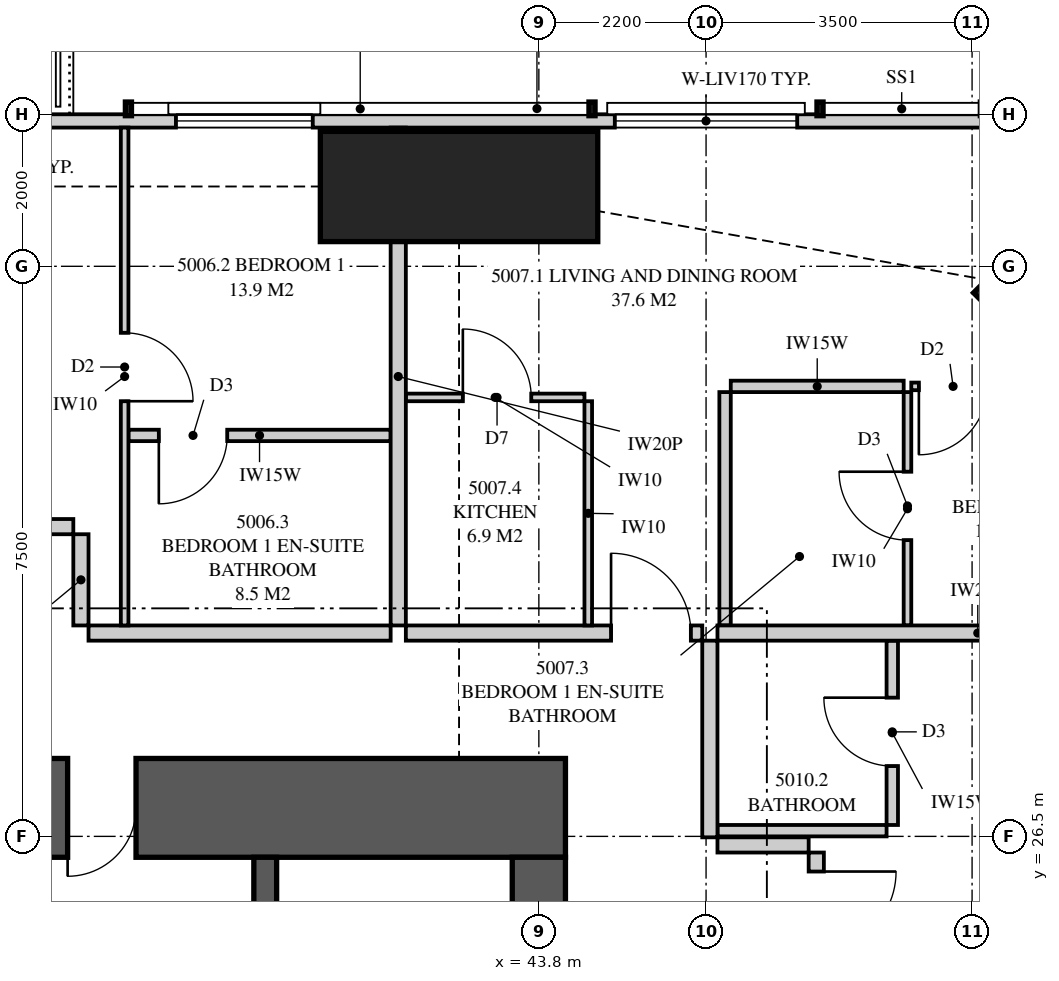
"""IFC4 building model, lengths in metres.
Left out: names, types, materials, properties, quantities, classifications, styles, units other than length and angle.
Written with IfcOpenShell. Run it as: python <this file> out.ifc"""

import sys

from ifc_helpers import new_model, si_unit, direction, frame, frame_2d, origin, origin_2d, place, context, subcontext, project, spatial, polyline, rectangle, outline, extrude, element, fill, save


model = new_model("IFC4")
c1 = context("Model", 3, precision=1e-05, world=origin(), true_north=direction((0.0, 1.0)))
c2 = subcontext(c1, "Body", "Model", "MODEL_VIEW")
j1 = project(units=[si_unit("LENGTHUNIT", "METRE"), si_unit("PLANEANGLEUNIT", "RADIAN")], contexts=[c1])
p1 = place(None, origin())
s1 = spatial("IfcSite", under=j1, at=p1, CompositionType="ELEMENT")
p2 = place(p1, origin())
s2 = spatial("IfcBuilding", under=s1, at=p2, CompositionType="ELEMENT")
p3 = place(p2, frame((0.0, 0.0, 184.5)))
s3 = spatial("IfcBuildingStorey", under=s2, at=p3, CompositionType="ELEMENT", Elevation=184.5)
p4 = place(p3, frame((50.652, 33.652, 0.0), z_axis=(0.0, 0.0, 1.0), x_axis=(0.707106781187, 0.707106781187, 0.0)))
e1 = element("IfcColumn", 1, at=p4, inside=s3, PredefinedType="COLUMN", context=c2, shape_type="SweptSolid", body=[
    extrude(rectangle(XDim=1.6, YDim=1.6, at=origin_2d()), origin(), (0.0, 0.0, 1.0), 3.35),
])
p5 = place(p3, frame((42.75, 35.05, 0.0), z_axis=(0.0, 0.0, 1.0), x_axis=(0.0, 1.0, 0.0)))
e2 = element("IfcColumn", 2, at=p5, inside=s3, PredefinedType="COLUMN", context=c2, shape_type="SweptSolid", body=[
    extrude(rectangle(XDim=1.45, YDim=3.65, at=origin_2d()), origin(), (0.0, 0.0, 1.0), 3.35),
])
p6 = place(p3, frame((44.15, 26.875, 0.0), z_axis=(0.0, 0.0, 1.0), x_axis=(-1.0, 0.0, 0.0)))
e3 = element("IfcWall", 3, at=p6, inside=s3, PredefinedType="SHEAR", context=c2, shape_type="SweptSolid", body=[
    extrude(rectangle(XDim=8.25, YDim=1.3, at=frame_2d((4.125, 0.0))), origin(), (0.0, 0.0, 1.0), 3.35),
])
p7 = place(p6, frame((5.65, 0.0, 0.0)))
e4 = element("IfcOpeningElement", 4, at=p7, cuts=e3, PredefinedType="OPENING", context=c2, shape_type="SweptSolid", body=[
    extrude(rectangle(XDim=0.9, YDim=2.1, at=frame_2d((0.45, 1.05))), frame((0.0, 0.66, 0.0), z_axis=(0.0, -1.0, 0.0), x_axis=(1.0, 0.0, 0.0)), (0.0, 0.0, 1.0), 1.32),
])
p8 = place(p3, frame((43.8, 19.3, 0.0), z_axis=(0.0, 0.0, 1.0), x_axis=(0.0, 1.0, 0.0)))
e5 = element("IfcWall", 5, at=p8, inside=s3, PredefinedType="SHEAR", context=c2, shape_type="SweptSolid", body=[
    extrude(rectangle(XDim=6.925, YDim=0.7, at=frame_2d((3.462, 0.0))), origin(), (0.0, 0.0, 1.0), 3.35),
])
p9 = place(p3, frame((40.2, 18.5, 0.0), z_axis=(0.0, 0.0, 1.0), x_axis=(0.0, 1.0, 0.0)))
e6 = element("IfcWall", 6, at=p9, inside=s3, PredefinedType="SHEAR", context=c2, shape_type="SweptSolid", body=[
    extrude(rectangle(XDim=7.725, YDim=0.3, at=frame_2d((3.863, 0.0))), origin(), (0.0, 0.0, 1.0), 3.35),
])
p10 = place(p3, frame((49.949, 35.913, 0.0), z_axis=(0.0, 0.0, 1.0), x_axis=(-1.0, 0.0, 0.0)))
e7 = element("IfcWall", 7, at=p10, inside=s3, PredefinedType="SOLIDWALL", context=c2, shape_type="SweptSolid", body=[
    extrude(outline(polyline([(0.0, 0.0), (34.897, 0.0), (34.897, 3.11), (27.91, 3.11), (27.91, 2.15), (27.836, 2.15), (27.836, 3.11), (27.699, 3.11), (27.699, 2.15), (7.199, 2.15), (7.199, 3.11), (7.062, 3.11), (7.062, 2.15), (6.987, 2.15), (6.987, 3.11), (0.0, 3.11), (0.0, 0.0)])), frame((0.0, 0.087, 0.0), z_axis=(0.0, -1.0, 0.0), x_axis=(1.0, 0.0, 0.0)), (0.0, 0.0, 1.0), 0.175),
])
p11 = place(p10, frame((2.75, 0.0, 0.4)))
e8 = element("IfcOpeningElement", 8, at=p11, cuts=e7, PredefinedType="OPENING", context=c2, shape_type="SweptSolid", body=[
    extrude(rectangle(XDim=2.4, YDim=1.7, at=frame_2d((1.2, 0.85))), frame((0.0, 0.097, 0.0), z_axis=(0.0, -1.0, 0.0), x_axis=(1.0, 0.0, 0.0)), (0.0, 0.0, 1.0), 0.195),
])
p12 = place(p10, frame((9.124, 0.0, 0.4)))
e9 = element("IfcOpeningElement", 9, at=p12, cuts=e7, PredefinedType="OPENING", context=c2, shape_type="SweptSolid", body=[
    extrude(rectangle(XDim=1.8, YDim=1.7, at=frame_2d((0.9, 0.85))), frame((0.0, 0.097, 0.0), z_axis=(0.0, -1.0, 0.0), x_axis=(1.0, 0.0, 0.0)), (0.0, 0.0, 1.0), 0.195),
])
p13 = place(p10, frame((13.174, 0.0, 0.0)))
e10 = element("IfcOpeningElement", 10, at=p13, cuts=e7, PredefinedType="OPENING", context=c2, shape_type="SweptSolid", body=[
    extrude(rectangle(XDim=1.8, YDim=2.1, at=frame_2d((0.9, 1.05))), frame((0.0, 0.097, 0.0), z_axis=(0.0, -1.0, 0.0), x_axis=(1.0, 0.0, 0.0)), (0.0, 0.0, 1.0), 0.195),
])
p14 = place(p10, frame((19.849, 0.0, 0.4)))
e11 = element("IfcOpeningElement", 11, at=p14, cuts=e7, PredefinedType="OPENING", context=c2, shape_type="SweptSolid", body=[
    extrude(rectangle(XDim=1.8, YDim=1.7, at=frame_2d((0.9, 0.85))), frame((0.0, 0.097, 0.0), z_axis=(0.0, -1.0, 0.0), x_axis=(1.0, 0.0, 0.0)), (0.0, 0.0, 1.0), 0.195),
])
p15 = place(p10, frame((23.304, 0.0, 0.4)))
e12 = element("IfcOpeningElement", 12, at=p15, cuts=e7, PredefinedType="OPENING", context=c2, shape_type="SweptSolid", body=[
    extrude(rectangle(XDim=2.4, YDim=1.7, at=frame_2d((1.2, 0.85))), frame((0.0, 0.097, 0.0), z_axis=(0.0, -1.0, 0.0), x_axis=(1.0, 0.0, 0.0)), (0.0, 0.0, 1.0), 0.195),
])
p16 = place(p10, frame((30.249, 0.0, 0.4)))
e13 = element("IfcOpeningElement", 13, at=p16, cuts=e7, PredefinedType="OPENING", context=c2, shape_type="SweptSolid", body=[
    extrude(rectangle(XDim=1.8, YDim=1.7, at=frame_2d((0.9, 0.85))), frame((0.0, 0.097, 0.0), z_axis=(0.0, -1.0, 0.0), x_axis=(1.0, 0.0, 0.0)), (0.0, 0.0, 1.0), 0.195),
])
p17 = place(p3, frame((41.95, 35.825, 0.0), z_axis=(0.0, 0.0, 1.0), x_axis=(0.0, -1.0, 0.0)))
e14 = element("IfcWall", 14, at=p17, inside=s3, PredefinedType="PARTITIONING", context=c2, shape_type="SweptSolid", body=[
    extrude(outline(polyline([(0.529, 2.15), (0.0, 2.15), (0.0, 0.0), (0.529, 0.0), (0.529, 0.746), (1.021, 0.746), (1.021, 0.0), (6.55, 0.0), (6.55, 3.11), (1.685, 3.11), (1.685, 2.15), (1.021, 2.15), (1.021, 1.404), (0.529, 1.404), (0.529, 2.15)])), frame((0.0, 0.1, 0.0), z_axis=(0.0, -1.0, 0.0), x_axis=(1.0, 0.0, 0.0)), (0.0, 0.0, 1.0), 0.2),
])
p18 = place(p3, frame((38.35, 35.825, 0.0), z_axis=(0.0, 0.0, 1.0), x_axis=(0.0, -1.0, 0.0)))
e15 = element("IfcWall", 15, at=p18, inside=s3, PredefinedType="PARTITIONING", context=c2, shape_type="SweptSolid", body=[
    extrude(outline(polyline([(0.0, 0.0), (6.55, 0.0), (6.55, 3.11), (1.635, 3.11), (1.635, 2.15), (0.0, 2.15), (0.0, 3.11), (0.0, 0.0)])), frame((0.0, 0.05, 0.0), z_axis=(0.0, -1.0, 0.0), x_axis=(1.0, 0.0, 0.0)), (0.0, 0.0, 1.0), 0.1),
])
p19 = place(p18, frame((2.7, 0.0, 0.0)))
e16 = element("IfcOpeningElement", 16, at=p19, cuts=e15, PredefinedType="OPENING", context=c2, shape_type="SweptSolid", body=[
    extrude(rectangle(XDim=0.9, YDim=2.1, at=frame_2d((0.45, 1.05))), frame((0.0, 0.06, 0.0), z_axis=(0.0, -1.0, 0.0), x_axis=(1.0, 0.0, 0.0)), (0.0, 0.0, 1.0), 0.12),
])
p20 = place(p3, frame((38.4, 31.775, 0.0), z_axis=(0.0, 0.0, 1.0), x_axis=(1.0, 0.0, 0.0)))
e17 = element("IfcWall", 17, at=p20, inside=s3, PredefinedType="PLUMBINGWALL", context=c2, shape_type="SweptSolid", body=[
    extrude(rectangle(XDim=3.45, YDim=0.15, at=frame_2d((1.725, 0.0))), origin(), (0.0, 0.0, 1.0), 3.11),
])
p21 = place(p20, frame((0.4, 0.0, 0.0)))
e18 = element("IfcOpeningElement", 18, at=p21, cuts=e17, PredefinedType="OPENING", context=c2, shape_type="SweptSolid", body=[
    extrude(rectangle(XDim=0.9, YDim=2.1, at=frame_2d((0.45, 1.05))), frame((0.0, 0.085, 0.0), z_axis=(0.0, -1.0, 0.0), x_axis=(1.0, 0.0, 0.0)), (0.0, 0.0, 1.0), 0.17),
])
p22 = place(p3, frame((42.05, 29.175, 0.0), z_axis=(0.0, 0.0, 1.0), x_axis=(1.0, 0.0, 0.0)))
e19 = element("IfcWall", 19, at=p22, inside=s3, PredefinedType="PARTITIONING", context=c2, shape_type="SweptSolid", body=[
    extrude(outline(polyline([(0.0, 0.0), (3.9, 0.0), (3.9, 3.11), (1.037, 3.11), (1.037, 2.541), (0.363, 2.541), (0.363, 3.11), (0.0, 3.11), (0.0, 0.0)])), frame((0.0, 0.1, 0.0), z_axis=(0.0, -1.0, 0.0), x_axis=(1.0, 0.0, 0.0)), (0.0, 0.0, 1.0), 0.2),
])
p23 = place(p22, frame((2.7, 0.0, 0.0)))
e20 = element("IfcOpeningElement", 20, at=p23, cuts=e19, PredefinedType="OPENING", context=c2, shape_type="SweptSolid", body=[
    extrude(rectangle(XDim=1.05, YDim=2.2, at=frame_2d((0.525, 1.1))), frame((0.0, 0.11, 0.0), z_axis=(0.0, -1.0, 0.0), x_axis=(1.0, 0.0, 0.0)), (0.0, 0.0, 1.0), 0.22),
])
p24 = place(p3, frame((48.65, 32.345, 0.0), z_axis=(0.0, 0.0, 1.0), x_axis=(0.0, -1.0, 0.0)))
e21 = element("IfcWall", 21, at=p24, inside=s3, PredefinedType="PARTITIONING", context=c2, shape_type="SweptSolid", body=[
    extrude(rectangle(XDim=3.07, YDim=0.1, at=frame_2d((1.535, 0.0))), origin(), (0.0, 0.0, 1.0), 3.11),
])
p25 = place(p24, frame((1.048, 0.0, 0.0)))
e22 = element("IfcOpeningElement", 22, at=p25, cuts=e21, PredefinedType="OPENING", context=c2, shape_type="SweptSolid", body=[
    extrude(rectangle(XDim=0.9, YDim=2.1, at=frame_2d((0.45, 1.05))), frame((0.0, 0.06, 0.0), z_axis=(0.0, -1.0, 0.0), x_axis=(1.0, 0.0, 0.0)), (0.0, 0.0, 1.0), 0.12),
])
p26 = place(p3, frame((48.7, 32.42, 0.0), z_axis=(0.0, 0.0, 1.0), x_axis=(1.0, 0.0, 0.0)))
e23 = element("IfcWall", 23, at=p26, inside=s3, PredefinedType="PARTITIONING", context=c2, shape_type="SweptSolid", body=[
    extrude(outline(polyline([(0.0, 0.0), (4.3, 0.0), (4.3, 3.11), (3.022, 3.11), (3.022, 2.15), (1.279, 2.15), (1.279, 3.11), (0.0, 3.11), (0.0, 0.0)])), frame((0.0, 0.05, 0.0), z_axis=(0.0, -1.0, 0.0), x_axis=(1.0, 0.0, 0.0)), (0.0, 0.0, 1.0), 0.1),
])
p27 = place(p26, frame((0.1, 0.0, 0.0)))
e24 = element("IfcOpeningElement", 24, at=p27, cuts=e23, PredefinedType="OPENING", context=c2, shape_type="SweptSolid", body=[
    extrude(rectangle(XDim=0.9, YDim=2.1, at=frame_2d((0.45, 1.05))), frame((0.0, 0.06, 0.0), z_axis=(0.0, -1.0, 0.0), x_axis=(1.0, 0.0, 0.0)), (0.0, 0.0, 1.0), 0.12),
])
p28 = place(p3, frame((46.325, 32.42, 0.0), z_axis=(0.0, 0.0, 1.0), x_axis=(1.0, 0.0, 0.0)))
e25 = element("IfcWall", 25, at=p28, inside=s3, PredefinedType="PLUMBINGWALL", context=c2, shape_type="SweptSolid", body=[
    extrude(rectangle(XDim=2.275, YDim=0.15, at=frame_2d((1.138, 0.0))), origin(), (0.0, 0.0, 1.0), 3.11),
])
p29 = place(p3, frame((46.25, 32.345, 0.0), z_axis=(0.0, 0.0, 1.0), x_axis=(0.0, -1.0, 0.0)))
e26 = element("IfcWall", 26, at=p29, inside=s3, PredefinedType="PLUMBINGWALL", context=c2, shape_type="SweptSolid", body=[
    extrude(rectangle(XDim=3.07, YDim=0.15, at=frame_2d((1.535, 0.0))), origin(), (0.0, 0.0, 1.0), 3.11),
])
p30 = place(p3, frame((42.05, 32.275, 0.0), z_axis=(0.0, 0.0, 1.0), x_axis=(1.0, 0.0, 0.0)))
e27 = element("IfcWall", 27, at=p30, inside=s3, PredefinedType="PARTITIONING", context=c2, shape_type="SweptSolid", body=[
    extrude(outline(polyline([(0.0, 0.0), (2.35, 0.0), (2.35, 3.11), (0.987, 3.11), (0.987, 2.541), (0.413, 2.541), (0.413, 3.11), (0.0, 3.11), (0.0, 0.0)])), frame((0.0, 0.05, 0.0), z_axis=(0.0, -1.0, 0.0), x_axis=(1.0, 0.0, 0.0)), (0.0, 0.0, 1.0), 0.1),
])
p31 = place(p30, frame((0.75, 0.0, 0.0)))
e28 = element("IfcOpeningElement", 28, at=p31, cuts=e27, PredefinedType="OPENING", context=c2, shape_type="SweptSolid", body=[
    extrude(rectangle(XDim=0.9, YDim=2.1, at=frame_2d((0.45, 1.05))), frame((0.0, 0.06, 0.0), z_axis=(0.0, -1.0, 0.0), x_axis=(1.0, 0.0, 0.0)), (0.0, 0.0, 1.0), 0.12),
])
p32 = place(p3, frame((44.45, 32.225, 0.0), z_axis=(0.0, 0.0, 1.0), x_axis=(0.0, -1.0, 0.0)))
e29 = element("IfcWall", 29, at=p32, inside=s3, PredefinedType="PARTITIONING", context=c2, shape_type="SweptSolid", body=[
    extrude(rectangle(XDim=2.95, YDim=0.1, at=frame_2d((1.475, 0.0))), origin(), (0.0, 0.0, 1.0), 3.11),
])
p33 = place(p3, frame((46.15, 29.175, 0.0), z_axis=(0.0, 0.0, 1.0), x_axis=(1.0, 0.0, 0.0)))
e30 = element("IfcWall", 30, at=p33, inside=s3, PredefinedType="PARTITIONING", context=c2, shape_type="SweptSolid", body=[
    extrude(outline(polyline([(0.0, 0.0), (6.85, 0.0), (6.85, 3.11), (6.147, 3.11), (6.147, 2.15), (4.303, 2.15), (4.303, 3.11), (0.0, 3.11), (0.0, 0.0)])), frame((0.0, 0.1, 0.0), z_axis=(0.0, -1.0, 0.0), x_axis=(1.0, 0.0, 0.0)), (0.0, 0.0, 1.0), 0.2),
])
p34 = place(p3, frame((48.45, 26.65, 0.0), z_axis=(0.0, 0.0, 1.0), x_axis=(0.0, 1.0, 0.0)))
e31 = element("IfcWall", 31, at=p34, inside=s3, PredefinedType="PLUMBINGWALL", context=c2, shape_type="SweptSolid", body=[
    extrude(rectangle(XDim=2.425, YDim=0.15, at=frame_2d((1.212, 0.0))), origin(), (0.0, 0.0, 1.0), 3.11),
])
p35 = place(p34, frame((0.775, 0.0, 0.0)))
e32 = element("IfcOpeningElement", 32, at=p35, cuts=e31, PredefinedType="OPENING", context=c2, shape_type="SweptSolid", body=[
    extrude(rectangle(XDim=0.9, YDim=2.1, at=frame_2d((0.45, 1.05))), frame((0.0, 0.085, 0.0), z_axis=(0.0, -1.0, 0.0), x_axis=(1.0, 0.0, 0.0)), (0.0, 0.0, 1.0), 0.17),
])
p36 = place(p3, frame((48.375, 26.575, 0.0), z_axis=(0.0, 0.0, 1.0), x_axis=(-1.0, 0.0, 0.0)))
e33 = element("IfcWall", 33, at=p36, inside=s3, PredefinedType="PLUMBINGWALL", context=c2, shape_type="SweptSolid", body=[
    extrude(rectangle(XDim=2.225, YDim=0.15, at=frame_2d((1.113, 0.0))), origin(), (0.0, 0.0, 1.0), 3.11),
])
p37 = place(p3, frame((37.875, 29.175, 0.0), z_axis=(0.0, 0.0, 1.0), x_axis=(1.0, 0.0, 0.0)))
e34 = element("IfcWall", 34, at=p37, inside=s3, PredefinedType="PARTITIONING", context=c2, shape_type="SweptSolid", body=[
    extrude(rectangle(XDim=3.975, YDim=0.2, at=frame_2d((1.988, 0.0))), origin(), (0.0, 0.0, 1.0), 3.11),
])
p38 = place(p3, frame((35.275, 30.575, 0.0), z_axis=(0.0, 0.0, 1.0), x_axis=(1.0, 0.0, 0.0)))
e35 = element("IfcWall", 35, at=p38, inside=s3, PredefinedType="PARTITIONING", context=c2, shape_type="SweptSolid", body=[
    extrude(rectangle(XDim=2.4, YDim=0.2, at=frame_2d((1.2, 0.0))), origin(), (0.0, 0.0, 1.0), 3.11),
])
p39 = place(p38, frame((0.7, 0.0, 0.0)))
e36 = element("IfcOpeningElement", 36, at=p39, cuts=e35, PredefinedType="OPENING", context=c2, shape_type="SweptSolid", body=[
    extrude(rectangle(XDim=1.05, YDim=2.2, at=frame_2d((0.525, 1.1))), frame((0.0, 0.11, 0.0), z_axis=(0.0, -1.0, 0.0), x_axis=(1.0, 0.0, 0.0)), (0.0, 0.0, 1.0), 0.22),
])
p40 = place(p3, frame((37.775, 29.275, 0.0), z_axis=(0.0, 0.0, 1.0), x_axis=(0.0, 1.0, 0.0)))
e37 = element("IfcWall", 37, at=p40, inside=s3, PredefinedType="PARTITIONING", context=c2, shape_type="SweptSolid", body=[
    extrude(rectangle(XDim=1.2, YDim=0.2, at=frame_2d((0.6, 0.0))), origin(), (0.0, 0.0, 1.0), 3.11),
])
p41 = place(p3, frame((46.05, 26.488, 0.0), z_axis=(0.0, 0.0, 1.0), x_axis=(0.0, 1.0, 0.0)))
e38 = element("IfcWall", 38, at=p41, inside=s3, PredefinedType="PARTITIONING", context=c2, shape_type="SweptSolid", body=[
    extrude(rectangle(XDim=2.587, YDim=0.2, at=frame_2d((1.294, 0.0))), origin(), (0.0, 0.0, 1.0), 3.11),
])
p42 = place(p3, frame((47.45, 23.887, 0.0), z_axis=(0.0, 0.0, 1.0), x_axis=(0.0, 1.0, 0.0)))
e39 = element("IfcWall", 39, at=p42, inside=s3, PredefinedType="PARTITIONING", context=c2, shape_type="SweptSolid", body=[
    extrude(outline(polyline([(0.0, 0.0), (2.4, 0.0), (2.4, 3.11), (1.45, 3.11), (1.45, 2.541), (0.775, 2.541), (0.775, 3.11), (0.0, 3.11), (0.0, 0.0)])), frame((0.0, 0.1, 0.0), z_axis=(0.0, -1.0, 0.0), x_axis=(1.0, 0.0, 0.0)), (0.0, 0.0, 1.0), 0.2),
])
p43 = place(p42, frame((1.1, 0.0, 0.0)))
e40 = element("IfcOpeningElement", 40, at=p43, cuts=e39, PredefinedType="OPENING", context=c2, shape_type="SweptSolid", body=[
    extrude(rectangle(XDim=1.05, YDim=2.2, at=frame_2d((0.525, 1.1))), frame((0.0, 0.11, 0.0), z_axis=(0.0, -1.0, 0.0), x_axis=(1.0, 0.0, 0.0)), (0.0, 0.0, 1.0), 0.22),
])
p44 = place(p3, frame((46.15, 26.387, 0.0), z_axis=(0.0, 0.0, 1.0), x_axis=(1.0, 0.0, 0.0)))
e41 = element("IfcWall", 41, at=p44, inside=s3, PredefinedType="PARTITIONING", context=c2, shape_type="SweptSolid", body=[
    extrude(rectangle(XDim=1.2, YDim=0.2, at=frame_2d((0.6, 0.0))), origin(), (0.0, 0.0, 1.0), 3.11),
])
p45 = place(p11, origin())
e42 = element("IfcWindow", 42, at=p45, inside=s3, PartitioningType="SINGLE_PANEL", PredefinedType="WINDOW", context=c2, shape_type="SweptSolid", body=[
    extrude(rectangle(XDim=2.4, YDim=1.7, at=frame_2d((1.2, 0.85))), frame((0.0, 0.03, 0.0), z_axis=(0.0, -1.0, 0.0), x_axis=(1.0, 0.0, 0.0)), (0.0, 0.0, 1.0), 0.06),
])
fill(e8, e42)
p46 = place(p12, origin())
e43 = element("IfcWindow", 43, at=p46, inside=s3, PartitioningType="SINGLE_PANEL", PredefinedType="WINDOW", context=c2, shape_type="SweptSolid", body=[
    extrude(rectangle(XDim=1.8, YDim=1.7, at=frame_2d((0.9, 0.85))), frame((0.0, 0.03, 0.0), z_axis=(0.0, -1.0, 0.0), x_axis=(1.0, 0.0, 0.0)), (0.0, 0.0, 1.0), 0.06),
])
fill(e9, e43)
p47 = place(p19, origin())
e44 = element("IfcDoor", 44, at=p47, inside=s3, OperationType="SINGLE_SWING_RIGHT", PredefinedType="DOOR", context=c2, shape_type="SweptSolid", body=[
    extrude(rectangle(XDim=0.9, YDim=2.1, at=frame_2d((0.45, 1.05))), frame((0.0, 0.025, 0.0), z_axis=(0.0, -1.0, 0.0), x_axis=(1.0, 0.0, 0.0)), (0.0, 0.0, 1.0), 0.05),
])
fill(e16, e44)
p48 = place(p21, frame((0.9, 0.0, 0.0), z_axis=(0.0, 0.0, 1.0), x_axis=(-1.0, 0.0, 0.0)))
e45 = element("IfcDoor", 45, at=p48, inside=s3, OperationType="SINGLE_SWING_RIGHT", PredefinedType="DOOR", context=c2, shape_type="SweptSolid", body=[
    extrude(rectangle(XDim=0.9, YDim=2.1, at=frame_2d((0.45, 1.05))), frame((0.0, 0.025, 0.0), z_axis=(0.0, -1.0, 0.0), x_axis=(1.0, 0.0, 0.0)), (0.0, 0.0, 1.0), 0.05),
])
fill(e18, e45)
p49 = place(p23, origin())
e46 = element("IfcDoor", 46, at=p49, inside=s3, OperationType="SINGLE_SWING_LEFT", PredefinedType="DOOR", context=c2, shape_type="SweptSolid", body=[
    extrude(rectangle(XDim=1.05, YDim=2.2, at=frame_2d((0.525, 1.1))), frame((0.0, 0.025, 0.0), z_axis=(0.0, -1.0, 0.0), x_axis=(1.0, 0.0, 0.0)), (0.0, 0.0, 1.0), 0.05),
])
fill(e20, e46)
p50 = place(p27, frame((0.9, 0.0, 0.0), z_axis=(0.0, 0.0, 1.0), x_axis=(-1.0, 0.0, 0.0)))
e47 = element("IfcDoor", 47, at=p50, inside=s3, OperationType="SINGLE_SWING_RIGHT", PredefinedType="DOOR", context=c2, shape_type="SweptSolid", body=[
    extrude(rectangle(XDim=0.9, YDim=2.1, at=frame_2d((0.45, 1.05))), frame((0.0, 0.025, 0.0), z_axis=(0.0, -1.0, 0.0), x_axis=(1.0, 0.0, 0.0)), (0.0, 0.0, 1.0), 0.05),
])
fill(e24, e47)
p51 = place(p25, frame((0.9, 0.0, 0.0), z_axis=(0.0, 0.0, 1.0), x_axis=(-1.0, 0.0, 0.0)))
e48 = element("IfcDoor", 48, at=p51, inside=s3, OperationType="SINGLE_SWING_RIGHT", PredefinedType="DOOR", context=c2, shape_type="SweptSolid", body=[
    extrude(rectangle(XDim=0.9, YDim=2.1, at=frame_2d((0.45, 1.05))), frame((0.0, 0.025, 0.0), z_axis=(0.0, -1.0, 0.0), x_axis=(1.0, 0.0, 0.0)), (0.0, 0.0, 1.0), 0.05),
])
fill(e22, e48)
p52 = place(p31, origin())
e49 = element("IfcDoor", 49, at=p52, inside=s3, OperationType="SINGLE_SWING_LEFT", PredefinedType="DOOR", context=c2, shape_type="SweptSolid", body=[
    extrude(rectangle(XDim=0.9, YDim=2.1, at=frame_2d((0.45, 1.05))), frame((0.0, 0.025, 0.0), z_axis=(0.0, -1.0, 0.0), x_axis=(1.0, 0.0, 0.0)), (0.0, 0.0, 1.0), 0.05),
])
fill(e28, e49)
p53 = place(p43, frame((1.05, 0.0, 0.0), z_axis=(0.0, 0.0, 1.0), x_axis=(-1.0, 0.0, 0.0)))
e50 = element("IfcDoor", 50, at=p53, inside=s3, OperationType="SINGLE_SWING_LEFT", PredefinedType="DOOR", context=c2, shape_type="SweptSolid", body=[
    extrude(rectangle(XDim=1.05, YDim=2.2, at=frame_2d((0.525, 1.1))), frame((0.0, 0.025, 0.0), z_axis=(0.0, -1.0, 0.0), x_axis=(1.0, 0.0, 0.0)), (0.0, 0.0, 1.0), 0.05),
])
fill(e40, e50)
p54 = place(p35, origin())
e51 = element("IfcDoor", 51, at=p54, inside=s3, OperationType="SINGLE_SWING_RIGHT", PredefinedType="DOOR", context=c2, shape_type="SweptSolid", body=[
    extrude(rectangle(XDim=0.9, YDim=2.1, at=frame_2d((0.45, 1.05))), frame((0.0, 0.025, 0.0), z_axis=(0.0, -1.0, 0.0), x_axis=(1.0, 0.0, 0.0)), (0.0, 0.0, 1.0), 0.05),
])
fill(e32, e51)
p55 = place(p7, origin())
e52 = element("IfcDoor", 52, at=p55, inside=s3, OperationType="SINGLE_SWING_RIGHT", PredefinedType="DOOR", context=c2, shape_type="SweptSolid", body=[
    extrude(rectangle(XDim=0.9, YDim=2.1, at=frame_2d((0.45, 1.05))), frame((0.0, 0.47, 0.0), z_axis=(0.0, -1.0, 0.0), x_axis=(1.0, 0.0, 0.0)), (0.0, 0.0, 1.0), 0.8),
])
fill(e4, e52)
save(model, sys.argv[1])
